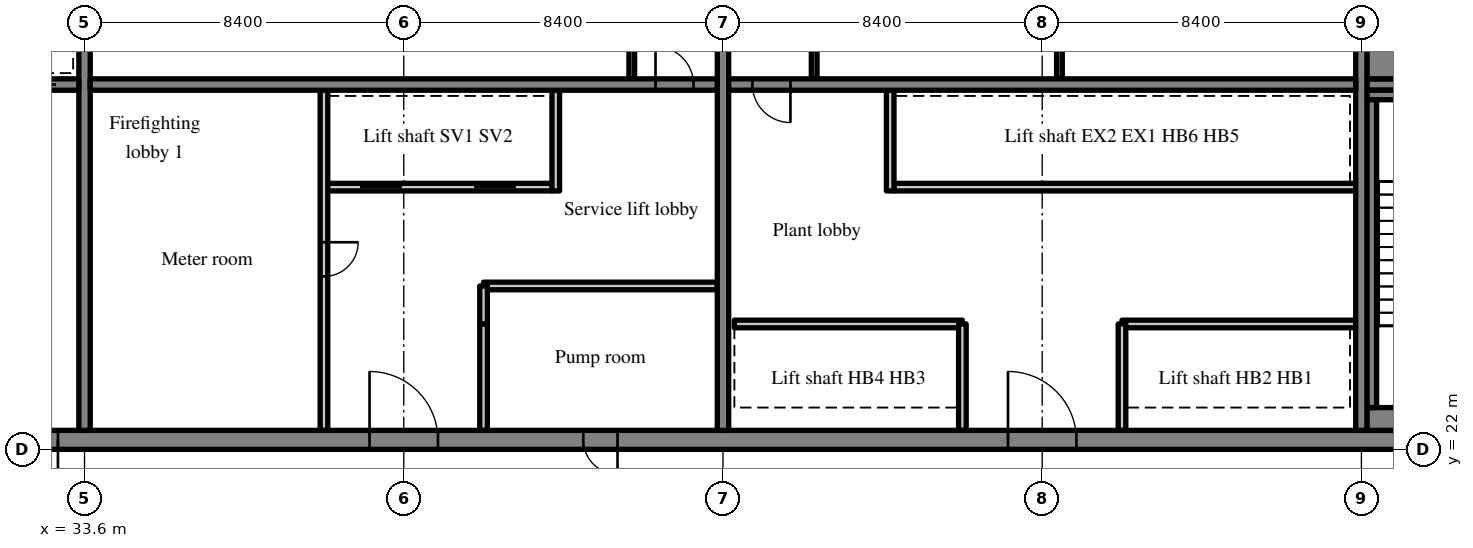
"""IFC4 building model, lengths in metres.
Left out: names, types, materials, properties, quantities, classifications, styles, units other than length and angle.
Written with IfcOpenShell. Run it as: python <this file> out.ifc"""

import sys

from ifc_helpers import new_model, si_unit, direction, frame, frame_2d, origin, place, context, subcontext, project, spatial, rectangle, extrude, source, transform, mapped, element, fill, save


model = new_model("IFC4")
c1 = context("Model", 3, precision=1e-05, world=origin(), true_north=direction((0.0, 1.0)))
c2 = subcontext(c1, "Body", "Model", "MODEL_VIEW")
j1 = project(units=[si_unit("LENGTHUNIT", "METRE"), si_unit("PLANEANGLEUNIT", "RADIAN")], contexts=[c1])
p1 = place(None, origin())
s1 = spatial("IfcSite", under=j1, at=p1, CompositionType="ELEMENT")
p2 = place(p1, origin())
s2 = spatial("IfcBuilding", under=s1, at=p2, CompositionType="ELEMENT")
p3 = place(p2, frame((0.0, 0.0, 317.7)))
s3 = spatial("IfcBuildingStorey", under=s2, at=p3, CompositionType="ELEMENT", Elevation=317.7)
m1 = source(origin(), c2, "Body", "SweptSolid", [
    extrude(rectangle(XDim=50.4, YDim=0.5, at=frame_2d((25.2, 0.0))), origin(), (0.0, 0.0, 1.0), 5.72),
])
p4 = place(p3, frame((25.2, 22.25, 0.0), z_axis=(0.0, 0.0, 1.0), x_axis=(1.0, 0.0, 0.0)))
e1 = element("IfcWall", 1, at=p4, inside=s3, PredefinedType="SHEAR", context=c2, shape_type="MappedRepresentation", body=[
    mapped(m1, transform((0.0, 0.0, 0.0), scale=1.0)),
])
m2 = source(origin(), c2, "Body", "SweptSolid", [
    extrude(rectangle(XDim=1.8, YDim=2.1, at=frame_2d((0.9, 1.05))), frame((0.0, 0.26, 0.0), z_axis=(0.0, -1.0, 0.0), x_axis=(1.0, 0.0, 0.0)), (0.0, 0.0, 1.0), 0.52),
])
p5 = place(p4, frame((15.9, 0.0, 0.0)))
e2 = element("IfcOpeningElement", 2, at=p5, cuts=e1, PredefinedType="OPENING", context=c2, shape_type="MappedRepresentation", body=[
    mapped(m2, transform((0.0, 0.0, 0.0), scale=1.0)),
])
m3 = source(origin(), c2, "Body", "SweptSolid", [
    extrude(rectangle(XDim=0.9, YDim=2.1, at=frame_2d((0.45, 1.05))), frame((0.0, 0.26, 0.0), z_axis=(0.0, -1.0, 0.0), x_axis=(1.0, 0.0, 0.0)), (0.0, 0.0, 1.0), 0.52),
])
p6 = place(p4, frame((21.525, 0.0, 0.0)))
e3 = element("IfcOpeningElement", 3, at=p6, cuts=e1, PredefinedType="OPENING", context=c2, shape_type="MappedRepresentation", body=[
    mapped(m3, transform((0.0, 0.0, 0.0), scale=1.0)),
])
p7 = place(p4, frame((32.7, 0.0, 0.0)))
e4 = element("IfcOpeningElement", 4, at=p7, cuts=e1, PredefinedType="OPENING", context=c2, shape_type="MappedRepresentation", body=[
    mapped(m2, transform((0.0, 0.0, 0.0), scale=1.0)),
])
m4 = source(origin(), c2, "Body", "SweptSolid", [
    extrude(rectangle(XDim=1.2, YDim=2.1, at=frame_2d((0.6, 1.05))), frame((0.0, 0.26, 0.0), z_axis=(0.0, -1.0, 0.0), x_axis=(1.0, 0.0, 0.0)), (0.0, 0.0, 1.0), 0.52),
])
p8 = place(p4, frame((6.5, 0.0, 0.0)))
e5 = element("IfcOpeningElement", 5, at=p8, cuts=e1, PredefinedType="OPENING", context=c2, shape_type="MappedRepresentation", body=[
    mapped(m4, transform((0.0, 0.0, 0.0), scale=1.0)),
])
p9 = place(p4, frame((47.975, 0.0, 0.0)))
e6 = element("IfcOpeningElement", 6, at=p9, cuts=e1, PredefinedType="OPENING", context=c2, shape_type="MappedRepresentation", body=[
    mapped(m4, transform((0.0, 0.0, 0.0), scale=1.0)),
])
m5 = source(origin(), c2, "Body", "SweptSolid", [
    extrude(rectangle(XDim=19.0, YDim=0.3, at=frame_2d((9.5, 0.0))), origin(), (0.0, 0.0, 1.0), 5.72),
])
p10 = place(p3, frame((33.6, 22.5, 0.0), z_axis=(0.0, 0.0, 1.0), x_axis=(0.0, 1.0, 0.0)))
e7 = element("IfcWall", 7, at=p10, inside=s3, PredefinedType="SHEAR", context=c2, shape_type="MappedRepresentation", body=[
    mapped(m5, transform((0.0, 0.0, 0.0), scale=1.0)),
])
m6 = source(origin(), c2, "Body", "SweptSolid", [
    extrude(rectangle(XDim=1.1, YDim=2.1, at=frame_2d((0.55, 1.05))), frame((0.0, 0.16, 0.0), z_axis=(0.0, -1.0, 0.0), x_axis=(1.0, 0.0, 0.0)), (0.0, 0.0, 1.0), 0.32),
])
p11 = place(p10, frame((12.95, 0.0, 0.0)))
e8 = element("IfcOpeningElement", 8, at=p11, cuts=e7, PredefinedType="OPENING", context=c2, shape_type="MappedRepresentation", body=[
    mapped(m6, transform((0.0, 0.0, 0.0), scale=1.0)),
])
p12 = place(p3, frame((50.4, 22.5, 0.0), z_axis=(0.0, 0.0, 1.0), x_axis=(0.0, 1.0, 0.0)))
e9 = element("IfcWall", 9, at=p12, inside=s3, PredefinedType="SHEAR", context=c2, shape_type="MappedRepresentation", body=[
    mapped(m5, transform((0.0, 0.0, 0.0), scale=1.0)),
])
p13 = place(p12, frame((12.95, 0.0, 0.0)))
e10 = element("IfcOpeningElement", 10, at=p13, cuts=e9, PredefinedType="OPENING", context=c2, shape_type="MappedRepresentation", body=[
    mapped(m6, transform((0.0, 0.0, 0.0), scale=1.0)),
])
p14 = place(p3, frame((67.2, 22.5, 0.0), z_axis=(0.0, 0.0, 1.0), x_axis=(0.0, 1.0, 0.0)))
e11 = element("IfcWall", 11, at=p14, inside=s3, PredefinedType="SHEAR", context=c2, shape_type="MappedRepresentation", body=[
    mapped(m5, transform((0.0, 0.0, 0.0), scale=1.0)),
])
m7 = source(origin(), c2, "Body", "SweptSolid", [
    extrude(rectangle(XDim=7.75, YDim=0.3, at=frame_2d((3.875, 0.0))), origin(), (0.0, 0.0, 1.0), 5.72),
])
p15 = place(p3, frame((25.7, 31.6, 0.0), z_axis=(0.0, 0.0, 1.0), x_axis=(1.0, 0.0, 0.0)))
e12 = element("IfcWall", 12, at=p15, inside=s3, PredefinedType="SHEAR", context=c2, shape_type="MappedRepresentation", body=[
    mapped(m7, transform((0.0, 0.0, 0.0), scale=1.0)),
])
p16 = place(p15, frame((6.05, 0.0, 0.0)))
e13 = element("IfcOpeningElement", 13, at=p16, cuts=e12, PredefinedType="OPENING", context=c2, shape_type="MappedRepresentation", body=[
    mapped(m6, transform((0.0, 0.0, 0.0), scale=1.0)),
])
m8 = source(origin(), c2, "Body", "SweptSolid", [
    extrude(rectangle(XDim=16.5, YDim=0.3, at=frame_2d((8.25, 0.0))), origin(), (0.0, 0.0, 1.0), 5.72),
])
p17 = place(p3, frame((33.75, 31.6, 0.0), z_axis=(0.0, 0.0, 1.0), x_axis=(1.0, 0.0, 0.0)))
e14 = element("IfcWall", 14, at=p17, inside=s3, PredefinedType="SHEAR", context=c2, shape_type="MappedRepresentation", body=[
    mapped(m8, transform((0.0, 0.0, 0.0), scale=1.0)),
])
m9 = source(origin(), c2, "Body", "SweptSolid", [
    extrude(rectangle(XDim=1.0, YDim=2.1, at=frame_2d((0.5, 1.05))), frame((0.0, 0.16, 0.0), z_axis=(0.0, -1.0, 0.0), x_axis=(1.0, 0.0, 0.0)), (0.0, 0.0, 1.0), 0.32),
])
p18 = place(p17, frame((14.875, 0.0, 0.0)))
e15 = element("IfcOpeningElement", 15, at=p18, cuts=e14, PredefinedType="OPENING", context=c2, shape_type="MappedRepresentation", body=[
    mapped(m9, transform((0.0, 0.0, 0.0), scale=1.0)),
])
p19 = place(p3, frame((50.55, 31.6, 0.0), z_axis=(0.0, 0.0, 1.0), x_axis=(1.0, 0.0, 0.0)))
e16 = element("IfcWall", 16, at=p19, inside=s3, PredefinedType="SHEAR", context=c2, shape_type="MappedRepresentation", body=[
    mapped(m8, transform((0.0, 0.0, 0.0), scale=1.0)),
])
p20 = place(p19, frame((0.625, 0.0, 0.0)))
e17 = element("IfcOpeningElement", 17, at=p20, cuts=e16, PredefinedType="OPENING", context=c2, shape_type="MappedRepresentation", body=[
    mapped(m9, transform((0.0, 0.0, 0.0), scale=1.0)),
])
p21 = place(p3, frame((67.35, 31.6, 0.0), z_axis=(0.0, 0.0, 1.0), x_axis=(1.0, 0.0, 0.0)))
e18 = element("IfcWall", 18, at=p21, inside=s3, PredefinedType="SHEAR", context=c2, shape_type="MappedRepresentation", body=[
    mapped(m7, transform((0.0, 0.0, 0.0), scale=1.0)),
])
p22 = place(p21, frame((5.875, 0.0, 0.0)))
e19 = element("IfcOpeningElement", 19, at=p22, cuts=e18, PredefinedType="OPENING", context=c2, shape_type="MappedRepresentation", body=[
    mapped(m6, transform((0.0, 0.0, 0.0), scale=1.0)),
])
m10 = source(origin(), c2, "Body", "SweptSolid", [
    extrude(rectangle(XDim=6.0, YDim=0.2, at=frame_2d((3.0, 0.0))), origin(), (0.0, 0.0, 1.0), 5.72),
])
p23 = place(p3, frame((39.9, 28.9, 0.0), z_axis=(0.0, 0.0, 1.0), x_axis=(1.0, 0.0, 0.0)))
e20 = element("IfcWall", 20, at=p23, inside=s3, PredefinedType="SOLIDWALL", context=c2, shape_type="MappedRepresentation", body=[
    mapped(m10, transform((0.0, 0.0, 0.0), scale=1.0)),
])
m11 = source(origin(), c2, "Body", "SweptSolid", [
    extrude(rectangle(XDim=1.1, YDim=2.1, at=frame_2d((0.55, 1.05))), frame((0.0, 0.11, 0.0), z_axis=(0.0, -1.0, 0.0), x_axis=(1.0, 0.0, 0.0)), (0.0, 0.0, 1.0), 0.22),
])
p24 = place(p23, frame((0.95, 0.0, 0.0)))
e21 = element("IfcOpeningElement", 21, at=p24, cuts=e20, PredefinedType="OPENING", context=c2, shape_type="MappedRepresentation", body=[
    mapped(m11, transform((0.0, 0.0, 0.0), scale=1.0)),
])
p25 = place(p23, frame((3.95, 0.0, 0.0)))
e22 = element("IfcOpeningElement", 22, at=p25, cuts=e20, PredefinedType="OPENING", context=c2, shape_type="MappedRepresentation", body=[
    mapped(m11, transform((0.0, 0.0, 0.0), scale=1.0)),
])
m12 = source(origin(), c2, "Body", "SweptSolid", [
    extrude(rectangle(XDim=8.95, YDim=0.2, at=frame_2d((4.475, 0.0))), origin(), (0.0, 0.0, 1.0), 5.72),
])
p26 = place(p3, frame((39.9, 22.5, 0.0), z_axis=(0.0, 0.0, 1.0), x_axis=(0.0, 1.0, 0.0)))
e23 = element("IfcWall", 23, at=p26, inside=s3, PredefinedType="PARTITIONING", context=c2, shape_type="MappedRepresentation", body=[
    mapped(m12, transform((0.0, 0.0, 0.0), scale=1.0)),
])
m13 = source(origin(), c2, "Body", "SweptSolid", [
    extrude(rectangle(XDim=0.9, YDim=2.1, at=frame_2d((0.45, 1.05))), frame((0.0, 0.11, 0.0), z_axis=(0.0, -1.0, 0.0), x_axis=(1.0, 0.0, 0.0)), (0.0, 0.0, 1.0), 0.22),
])
p27 = place(p26, frame((4.05, 0.0, 0.0)))
e24 = element("IfcOpeningElement", 24, at=p27, cuts=e23, PredefinedType="OPENING", context=c2, shape_type="MappedRepresentation", body=[
    mapped(m13, transform((0.0, 0.0, 0.0), scale=1.0)),
])
m14 = source(origin(), c2, "Body", "SweptSolid", [
    extrude(rectangle(XDim=2.8, YDim=0.2, at=frame_2d((1.4, 0.0))), origin(), (0.0, 0.0, 1.0), 5.72),
])
p28 = place(p3, frame((44.1, 22.5, 0.0), z_axis=(0.0, 0.0, 1.0), x_axis=(0.0, 1.0, 0.0)))
e25 = element("IfcWall", 25, at=p28, inside=s3, PredefinedType="PARTITIONING", context=c2, shape_type="MappedRepresentation", body=[
    mapped(m14, transform((0.0, 0.0, 0.0), scale=1.0)),
])
m15 = source(origin(), c2, "Body", "SweptSolid", [
    extrude(rectangle(XDim=2.65, YDim=0.2, at=frame_2d((1.325, 0.0))), origin(), (0.0, 0.0, 1.0), 5.72),
])
p29 = place(p3, frame((46.0, 28.8, 0.0), z_axis=(0.0, 0.0, 1.0), x_axis=(0.0, 1.0, 0.0)))
e26 = element("IfcWall", 26, at=p29, inside=s3, PredefinedType="SOLIDWALL", context=c2, shape_type="MappedRepresentation", body=[
    mapped(m15, transform((0.0, 0.0, 0.0), scale=1.0)),
])
m16 = source(origin(), c2, "Body", "SweptSolid", [
    extrude(rectangle(XDim=6.15, YDim=0.2, at=frame_2d((3.075, 0.0))), origin(), (0.0, 0.0, 1.0), 5.72),
])
p30 = place(p3, frame((44.1, 26.3, 0.0), z_axis=(0.0, 0.0, 1.0), x_axis=(1.0, 0.0, 0.0)))
e27 = element("IfcWall", 27, at=p30, inside=s3, PredefinedType="PARTITIONING", context=c2, shape_type="MappedRepresentation", body=[
    mapped(m16, transform((0.0, 0.0, 0.0), scale=1.0)),
])
m17 = source(origin(), c2, "Body", "SweptSolid", [
    extrude(rectangle(XDim=1.0, YDim=0.2, at=frame_2d((0.5, 0.0))), origin(), (0.0, 0.0, 1.0), 5.72),
])
p31 = place(p3, frame((44.1, 25.3, 0.0), z_axis=(0.0, 0.0, 1.0), x_axis=(0.0, 1.0, 0.0)))
e28 = element("IfcWall", 28, at=p31, inside=s3, PredefinedType="PARTITIONING", context=c2, shape_type="MappedRepresentation", body=[
    mapped(m17, transform((0.0, 0.0, 0.0), scale=1.0)),
])
m18 = source(origin(), c2, "Body", "SweptSolid", [
    extrude(rectangle(XDim=3.25, YDim=0.15, at=frame_2d((1.625, 0.0))), origin(), (0.0, 0.0, 1.0), 5.72),
])
p32 = place(p3, frame((48.0, 31.75, 0.0), z_axis=(0.0, 0.0, 1.0), x_axis=(0.0, 1.0, 0.0)))
e29 = element("IfcWall", 29, at=p32, inside=s3, PredefinedType="PARTITIONING", context=c2, shape_type="MappedRepresentation", body=[
    mapped(m18, transform((0.0, 0.0, 0.0), scale=1.0)),
])
m19 = source(origin(), c2, "Body", "SweptSolid", [
    extrude(rectangle(XDim=6.15, YDim=0.2, at=frame_2d((3.075, 0.0))), origin(), (0.0, 0.0, 1.0), 5.72),
])
p33 = place(p3, frame((67.05, 25.3, 0.0), z_axis=(0.0, 0.0, 1.0), x_axis=(-1.0, 0.0, 0.0)))
e30 = element("IfcWall", 30, at=p33, inside=s3, PredefinedType="SOLIDWALL", context=c2, shape_type="MappedRepresentation", body=[
    mapped(m19, transform((0.0, 0.0, 0.0), scale=1.0)),
])
p34 = place(p3, frame((56.7, 25.3, 0.0), z_axis=(0.0, 0.0, 1.0), x_axis=(-1.0, 0.0, 0.0)))
e31 = element("IfcWall", 31, at=p34, inside=s3, PredefinedType="SOLIDWALL", context=c2, shape_type="MappedRepresentation", body=[
    mapped(m10, transform((0.0, 0.0, 0.0), scale=1.0)),
])
m20 = source(origin(), c2, "Body", "SweptSolid", [
    extrude(rectangle(XDim=12.15, YDim=0.2, at=frame_2d((6.075, 0.0))), origin(), (0.0, 0.0, 1.0), 5.72),
])
p35 = place(p3, frame((67.05, 28.9, 0.0), z_axis=(0.0, 0.0, 1.0), x_axis=(-1.0, 0.0, 0.0)))
e32 = element("IfcWall", 32, at=p35, inside=s3, PredefinedType="SOLIDWALL", context=c2, shape_type="MappedRepresentation", body=[
    mapped(m20, transform((0.0, 0.0, 0.0), scale=1.0)),
])
for number, where, z_axis, x_axis in (
    (33, (60.9, 22.5, 0.0), (0.0, 0.0, 1.0), (0.0, 1.0, 0.0)),
    (34, (56.7, 22.5, 0.0), (0.0, 0.0, 1.0), (0.0, 1.0, 0.0)),
):
    element("IfcWall", number, at=place(p3, frame(where, z_axis=z_axis, x_axis=x_axis)), inside=s3, PredefinedType="SOLIDWALL", context=c2, shape_type="MappedRepresentation", body=[
        mapped(m14, transform((0.0, 0.0, 0.0), scale=1.0)),
    ])
p36 = place(p3, frame((54.8, 28.8, 0.0), z_axis=(0.0, 0.0, 1.0), x_axis=(0.0, 1.0, 0.0)))
e35 = element("IfcWall", 35, at=p36, inside=s3, PredefinedType="SOLIDWALL", context=c2, shape_type="MappedRepresentation", body=[
    mapped(m15, transform((0.0, 0.0, 0.0), scale=1.0)),
])
for number, where, z_axis, x_axis in (
    (36, (52.8, 31.75, 0.0), (0.0, 0.0, 1.0), (0.0, 1.0, 0.0)),
    (37, (59.254, 31.75, 0.0), (0.0, 0.0, 1.0), (0.0, 1.0, 0.0)),
):
    element("IfcWall", number, at=place(p3, frame(where, z_axis=z_axis, x_axis=x_axis)), inside=s3, PredefinedType="PARTITIONING", context=c2, shape_type="MappedRepresentation", body=[
        mapped(m18, transform((0.0, 0.0, 0.0), scale=1.0)),
    ])
m21 = source(origin(), c2, "Body", "SweptSolid", [
    extrude(rectangle(XDim=4.9, YDim=0.6, at=frame_2d((2.45, 0.0))), origin(), (0.0, 0.0, 1.0), 5.72),
])
p37 = place(p3, frame((67.35, 22.8, 0.0), z_axis=(0.0, 0.0, 1.0), x_axis=(1.0, 0.0, 0.0)))
e38 = element("IfcWall", 38, at=p37, inside=s3, PredefinedType="SOLIDWALL", context=c2, shape_type="MappedRepresentation", body=[
    mapped(m21, transform((0.0, 0.0, 0.0), scale=1.0)),
])
m22 = source(origin(), c2, "Body", "SweptSolid", [
    extrude(rectangle(XDim=4.9, YDim=0.25, at=frame_2d((2.45, 0.0))), origin(), (0.0, 0.0, 1.0), 5.72),
])
p38 = place(p3, frame((67.35, 31.325, 0.0), z_axis=(0.0, 0.0, 1.0), x_axis=(1.0, 0.0, 0.0)))
e39 = element("IfcWall", 39, at=p38, inside=s3, PredefinedType="SOLIDWALL", context=c2, shape_type="MappedRepresentation", body=[
    mapped(m22, transform((0.0, 0.0, 0.0), scale=1.0)),
])
m23 = source(origin(), c2, "Body", "SweptSolid", [
    extrude(rectangle(XDim=8.1, YDim=0.25, at=frame_2d((4.05, 0.0))), origin(), (0.0, 0.0, 1.0), 5.72),
])
p39 = place(p3, frame((67.475, 23.1, 0.0), z_axis=(0.0, 0.0, 1.0), x_axis=(0.0, 1.0, 0.0)))
e40 = element("IfcWall", 40, at=p39, inside=s3, PredefinedType="SOLIDWALL", context=c2, shape_type="MappedRepresentation", body=[
    mapped(m23, transform((0.0, 0.0, 0.0), scale=1.0)),
])
m24 = source(origin(), c2, "Body", "SweptSolid", [
    extrude(rectangle(XDim=4.9, YDim=1.05, at=frame_2d((2.45, 0.0))), origin(), (0.0, 0.0, 1.0), 5.72),
])
p40 = place(p3, frame((67.35, 32.275, 0.0), z_axis=(0.0, 0.0, 1.0), x_axis=(1.0, 0.0, 0.0)))
e41 = element("IfcWall", 41, at=p40, inside=s3, PredefinedType="SOLIDWALL", context=c2, shape_type="MappedRepresentation", body=[
    mapped(m24, transform((0.0, 0.0, 0.0), scale=1.0)),
])
m25 = source(origin(), c2, "Body", "SweptSolid", [
    extrude(rectangle(XDim=1.8, YDim=2.1, at=frame_2d((0.9, 1.05))), frame((0.0, 0.175, 0.0), z_axis=(0.0, -1.0, 0.0), x_axis=(1.0, 0.0, 0.0)), (0.0, 0.0, 1.0), 0.05),
])
p41 = place(p5, origin())
e42 = element("IfcDoor", 42, at=p41, inside=s3, OperationType="DOUBLE_DOOR_SINGLE_SWING", PredefinedType="DOOR", context=c2, shape_type="MappedRepresentation", body=[
    mapped(m25, transform((0.0, 0.0, 0.0), scale=1.0)),
])
fill(e2, e42)
m26 = source(origin(), c2, "Body", "SweptSolid", [
    extrude(rectangle(XDim=1.0, YDim=2.1, at=frame_2d((0.5, 1.05))), frame((0.0, 0.025, 0.0), z_axis=(0.0, -1.0, 0.0), x_axis=(1.0, 0.0, 0.0)), (0.0, 0.0, 1.0), 0.05),
])
p42 = place(p18, origin())
e43 = element("IfcDoor", 43, at=p42, inside=s3, OperationType="SINGLE_SWING_LEFT", PredefinedType="DOOR", context=c2, shape_type="MappedRepresentation", body=[
    mapped(m26, transform((0.0, 0.0, 0.0), scale=1.0)),
])
fill(e15, e43)
m27 = source(origin(), c2, "Body", "SweptSolid", [
    extrude(rectangle(XDim=1.1, YDim=2.1, at=frame_2d((0.55, 1.05))), frame((0.0, 0.025, 0.0), z_axis=(0.0, -1.0, 0.0), x_axis=(1.0, 0.0, 0.0)), (0.0, 0.0, 1.0), 0.05),
])
p43 = place(p24, origin())
e44 = element("IfcDoor", 44, at=p43, inside=s3, OperationType="SLIDING_TO_LEFT", PredefinedType="DOOR", context=c2, shape_type="MappedRepresentation", body=[
    mapped(m27, transform((0.0, 0.0, 0.0), scale=1.0)),
])
fill(e21, e44)
p44 = place(p25, origin())
e45 = element("IfcDoor", 45, at=p44, inside=s3, OperationType="SLIDING_TO_RIGHT", PredefinedType="DOOR", context=c2, shape_type="MappedRepresentation", body=[
    mapped(m27, transform((0.0, 0.0, 0.0), scale=1.0)),
])
fill(e22, e45)
m28 = source(origin(), c2, "Body", "SweptSolid", [
    extrude(rectangle(XDim=0.9, YDim=2.1, at=frame_2d((0.45, 1.05))), frame((0.0, 0.025, 0.0), z_axis=(0.0, -1.0, 0.0), x_axis=(1.0, 0.0, 0.0)), (0.0, 0.0, 1.0), 0.05),
])
p45 = place(p27, origin())
e46 = element("IfcDoor", 46, at=p45, inside=s3, OperationType="SINGLE_SWING_RIGHT", PredefinedType="DOOR", context=c2, shape_type="MappedRepresentation", body=[
    mapped(m28, transform((0.0, 0.0, 0.0), scale=1.0)),
])
fill(e24, e46)
m29 = source(origin(), c2, "Body", "SweptSolid", [
    extrude(rectangle(XDim=0.9, YDim=2.1, at=frame_2d((0.45, 1.05))), frame((0.0, 0.175, 0.0), z_axis=(0.0, -1.0, 0.0), x_axis=(1.0, 0.0, 0.0)), (0.0, 0.0, 1.0), 0.05),
])
p46 = place(p6, origin())
e47 = element("IfcDoor", 47, at=p46, inside=s3, OperationType="SINGLE_SWING_RIGHT", PredefinedType="DOOR", context=c2, shape_type="MappedRepresentation", body=[
    mapped(m29, transform((0.0, 0.0, 0.0), scale=1.0)),
])
fill(e3, e47)
p47 = place(p7, origin())
e48 = element("IfcDoor", 48, at=p47, inside=s3, OperationType="DOUBLE_DOOR_SINGLE_SWING", PredefinedType="DOOR", context=c2, shape_type="MappedRepresentation", body=[
    mapped(m25, transform((0.0, 0.0, 0.0), scale=1.0)),
])
fill(e4, e48)
p48 = place(p20, origin())
e49 = element("IfcDoor", 49, at=p48, inside=s3, OperationType="SINGLE_SWING_RIGHT", PredefinedType="DOOR", context=c2, shape_type="MappedRepresentation", body=[
    mapped(m26, transform((0.0, 0.0, 0.0), scale=1.0)),
])
fill(e17, e49)
m30 = source(origin(), c2, "Body", "SweptSolid", [
    extrude(rectangle(XDim=1.2, YDim=2.1, at=frame_2d((0.6, 1.05))), frame((0.0, 0.175, 0.0), z_axis=(0.0, -1.0, 0.0), x_axis=(1.0, 0.0, 0.0)), (0.0, 0.0, 1.0), 0.05),
])
p49 = place(p8, origin())
e50 = element("IfcDoor", 50, at=p49, inside=s3, OperationType="SINGLE_SWING_RIGHT", PredefinedType="DOOR", context=c2, shape_type="MappedRepresentation", body=[
    mapped(m30, transform((0.0, 0.0, 0.0), scale=1.0)),
])
fill(e5, e50)
p50 = place(p16, origin())
e51 = element("IfcDoor", 51, at=p50, inside=s3, OperationType="SLIDING_TO_RIGHT", PredefinedType="DOOR", context=c2, shape_type="MappedRepresentation", body=[
    mapped(m27, transform((0.0, 0.0, 0.0), scale=1.0)),
])
fill(e13, e51)
save(model, sys.argv[1])
